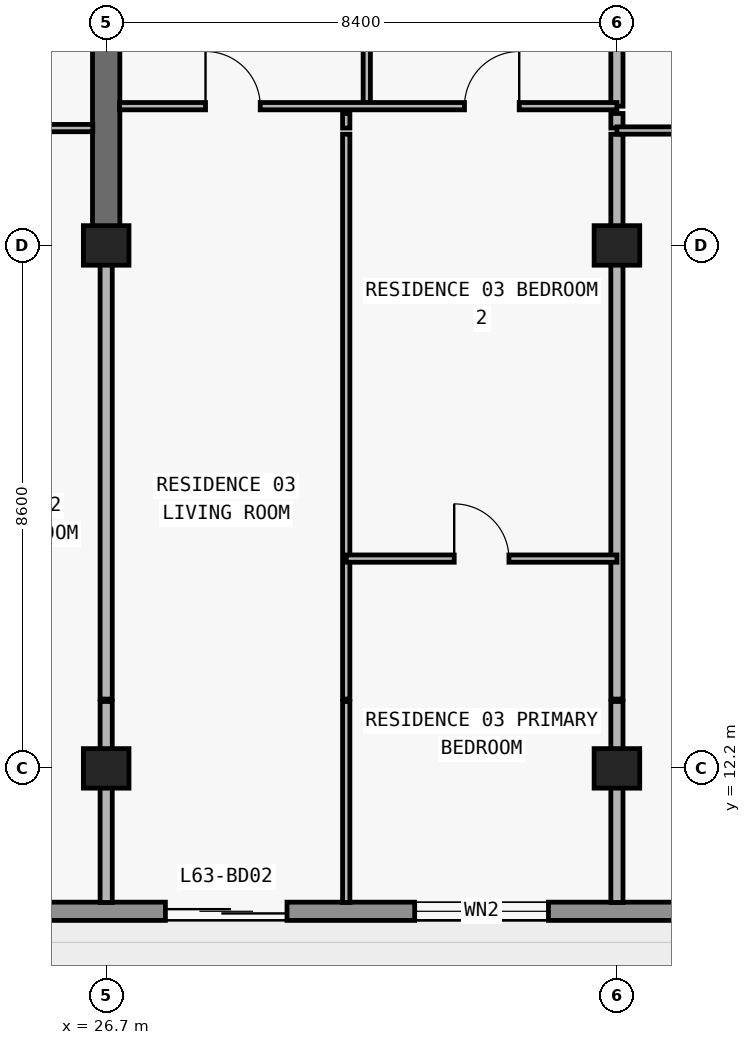
"""IFC4 building model, lengths in metres.
Left out: names, types, materials, properties, quantities, classifications, styles, units other than length and angle.
Written with IfcOpenShell. Run it as: python <this file> out.ifc"""

import sys

from ifc_helpers import new_model, si_unit, direction, frame, frame_2d, origin, origin_2d, place, context, subcontext, project, spatial, rectangle, extrude, element, fill, save


model = new_model("IFC4")
c1 = context("Model", 3, precision=1e-05, world=origin(), true_north=direction((0.0, 1.0)))
c2 = subcontext(c1, "Body", "Model", "MODEL_VIEW")
j1 = project(units=[si_unit("LENGTHUNIT", "METRE"), si_unit("PLANEANGLEUNIT", "RADIAN")], contexts=[c1])
p1 = place(None, origin())
s1 = spatial("IfcSite", under=j1, at=p1, CompositionType="ELEMENT")
p2 = place(p1, origin())
s2 = spatial("IfcBuilding", under=s1, at=p2, CompositionType="ELEMENT")
p3 = place(p2, frame((0.0, 0.0, 226.5)))
s3 = spatial("IfcBuildingStorey", under=s2, at=p3, CompositionType="ELEMENT", Elevation=226.5)
for number, where, z_axis, x_axis in (
    (1, (26.7, 12.2, 0.0), (0.0, 0.0, 1.0), (1.0, 0.0, 0.0)),
    (2, (35.1, 12.2, 0.0), (0.0, 0.0, 1.0), (1.0, 0.0, 0.0)),
    (3, (26.7, 20.8, 0.0), (0.0, 0.0, 1.0), (1.0, 0.0, 0.0)),
    (4, (35.1, 20.8, 0.0), (0.0, 0.0, 1.0), (1.0, 0.0, 0.0)),
):
    element("IfcColumn", number, at=place(p3, frame(where, z_axis=z_axis, x_axis=x_axis)), inside=s3, PredefinedType="COLUMN", context=c2, shape_type="SweptSolid", body=[
        extrude(rectangle(XDim=0.75, YDim=0.65, at=origin_2d()), origin(), (0.0, 0.0, 1.0), 3.05),
    ])
p4 = place(p3, frame((26.7, 20.8, 0.0), z_axis=(0.0, 0.0, 1.0), x_axis=(0.0, 1.0, 0.0)))
e5 = element("IfcWall", 5, at=p4, inside=s3, PredefinedType="SHEAR", context=c2, shape_type="SweptSolid", body=[
    extrude(rectangle(XDim=8.6, YDim=0.45, at=frame_2d((4.3, 0.0))), origin(), (0.0, 0.0, 1.0), 3.05),
])
p5 = place(p3, frame((65.7, 9.85, 0.0), z_axis=(0.0, 0.0, 1.0), x_axis=(-1.0, 0.0, 0.0)))
e6 = element("IfcWall", 6, at=p5, inside=s3, PredefinedType="STANDARD", context=c2, shape_type="SweptSolid", body=[
    extrude(rectangle(XDim=53.6, YDim=0.3, at=frame_2d((26.8, 0.0))), origin(), (0.0, 0.0, 1.0), 3.05),
])
p6 = place(p5, frame((48.05, 0.0, 0.85)))
e7 = element("IfcOpeningElement", 7, at=p6, cuts=e6, PredefinedType="OPENING", context=c2, shape_type="SweptSolid", body=[
    extrude(rectangle(XDim=1.8, YDim=1.55, at=frame_2d((0.9, 0.775))), frame((0.0, 0.16, 0.0), z_axis=(0.0, -1.0, 0.0), x_axis=(1.0, 0.0, 0.0)), (0.0, 0.0, 1.0), 0.32),
])
p7 = place(p5, frame((44.09, 0.0, 0.0)))
e8 = element("IfcOpeningElement", 8, at=p7, cuts=e6, PredefinedType="OPENING", context=c2, shape_type="SweptSolid", body=[
    extrude(rectangle(XDim=2.0, YDim=2.3, at=frame_2d((1.0, 1.15))), frame((0.0, 0.16, 0.0), z_axis=(0.0, -1.0, 0.0), x_axis=(1.0, 0.0, 0.0)), (0.0, 0.0, 1.0), 0.32),
])
p8 = place(p5, frame((39.99, 0.0, 0.85)))
e9 = element("IfcOpeningElement", 9, at=p8, cuts=e6, PredefinedType="OPENING", context=c2, shape_type="SweptSolid", body=[
    extrude(rectangle(XDim=1.8, YDim=1.55, at=frame_2d((0.9, 0.775))), frame((0.0, 0.16, 0.0), z_axis=(0.0, -1.0, 0.0), x_axis=(1.0, 0.0, 0.0)), (0.0, 0.0, 1.0), 0.32),
])
p9 = place(p5, frame((36.026, 0.0, 0.0)))
e10 = element("IfcOpeningElement", 10, at=p9, cuts=e6, PredefinedType="OPENING", context=c2, shape_type="SweptSolid", body=[
    extrude(rectangle(XDim=2.0, YDim=2.3, at=frame_2d((1.0, 1.15))), frame((0.0, 0.16, 0.0), z_axis=(0.0, -1.0, 0.0), x_axis=(1.0, 0.0, 0.0)), (0.0, 0.0, 1.0), 0.32),
])
p10 = place(p5, frame((31.726, 0.0, 0.85)))
e11 = element("IfcOpeningElement", 11, at=p10, cuts=e6, PredefinedType="OPENING", context=c2, shape_type="SweptSolid", body=[
    extrude(rectangle(XDim=2.2, YDim=1.55, at=frame_2d((1.1, 0.775))), frame((0.0, 0.16, 0.0), z_axis=(0.0, -1.0, 0.0), x_axis=(1.0, 0.0, 0.0)), (0.0, 0.0, 1.0), 0.32),
])
p11 = place(p5, frame((27.51, 0.0, 0.0)))
e12 = element("IfcOpeningElement", 12, at=p11, cuts=e6, PredefinedType="OPENING", context=c2, shape_type="SweptSolid", body=[
    extrude(rectangle(XDim=2.0, YDim=2.3, at=frame_2d((1.0, 1.15))), frame((0.0, 0.16, 0.0), z_axis=(0.0, -1.0, 0.0), x_axis=(1.0, 0.0, 0.0)), (0.0, 0.0, 1.0), 0.32),
])
p12 = place(p5, frame((23.81, 0.0, 0.85)))
e13 = element("IfcOpeningElement", 13, at=p12, cuts=e6, PredefinedType="OPENING", context=c2, shape_type="SweptSolid", body=[
    extrude(rectangle(XDim=1.8, YDim=1.55, at=frame_2d((0.9, 0.775))), frame((0.0, 0.16, 0.0), z_axis=(0.0, -1.0, 0.0), x_axis=(1.0, 0.0, 0.0)), (0.0, 0.0, 1.0), 0.32),
])
p13 = place(p5, frame((20.026, 0.0, 0.0)))
e14 = element("IfcOpeningElement", 14, at=p13, cuts=e6, PredefinedType="OPENING", context=c2, shape_type="SweptSolid", body=[
    extrude(rectangle(XDim=2.0, YDim=2.3, at=frame_2d((1.0, 1.15))), frame((0.0, 0.16, 0.0), z_axis=(0.0, -1.0, 0.0), x_axis=(1.0, 0.0, 0.0)), (0.0, 0.0, 1.0), 0.32),
])
p14 = place(p5, frame((15.726, 0.0, 0.85)))
e15 = element("IfcOpeningElement", 15, at=p14, cuts=e6, PredefinedType="OPENING", context=c2, shape_type="SweptSolid", body=[
    extrude(rectangle(XDim=2.2, YDim=1.55, at=frame_2d((1.1, 0.775))), frame((0.0, 0.16, 0.0), z_axis=(0.0, -1.0, 0.0), x_axis=(1.0, 0.0, 0.0)), (0.0, 0.0, 1.0), 0.32),
])
p15 = place(p5, frame((11.29, 0.0, 0.0)))
e16 = element("IfcOpeningElement", 16, at=p15, cuts=e6, PredefinedType="OPENING", context=c2, shape_type="SweptSolid", body=[
    extrude(rectangle(XDim=2.0, YDim=2.3, at=frame_2d((1.0, 1.15))), frame((0.0, 0.16, 0.0), z_axis=(0.0, -1.0, 0.0), x_axis=(1.0, 0.0, 0.0)), (0.0, 0.0, 1.0), 0.32),
])
p16 = place(p5, frame((7.19, 0.0, 0.85)))
e17 = element("IfcOpeningElement", 17, at=p16, cuts=e6, PredefinedType="OPENING", context=c2, shape_type="SweptSolid", body=[
    extrude(rectangle(XDim=1.8, YDim=1.55, at=frame_2d((0.9, 0.775))), frame((0.0, 0.16, 0.0), z_axis=(0.0, -1.0, 0.0), x_axis=(1.0, 0.0, 0.0)), (0.0, 0.0, 1.0), 0.32),
])
p17 = place(p5, frame((0.65, 0.0, 0.85)))
e18 = element("IfcOpeningElement", 18, at=p17, cuts=e6, PredefinedType="OPENING", context=c2, shape_type="SweptSolid", body=[
    extrude(rectangle(XDim=1.8, YDim=1.55, at=frame_2d((0.9, 0.775))), frame((0.0, 0.16, 0.0), z_axis=(0.0, -1.0, 0.0), x_axis=(1.0, 0.0, 0.0)), (0.0, 0.0, 1.0), 0.32),
])
p18 = place(p3, frame((26.7, 9.995, 0.0), z_axis=(0.0, 0.0, 1.0), x_axis=(0.0, 1.0, 0.0)))
e19 = element("IfcWall", 19, at=p18, inside=s3, PredefinedType="PARTITIONING", context=c2, shape_type="SweptSolid", body=[
    extrude(rectangle(XDim=3.305, YDim=0.2, at=frame_2d((1.652, 0.0))), origin(), (0.0, 0.0, 1.0), 2.263),
])
p19 = place(p3, frame((26.7, 13.34, 0.0), z_axis=(0.0, 0.0, 1.0), x_axis=(0.0, 1.0, 0.0)))
e20 = element("IfcWall", 20, at=p19, inside=s3, PredefinedType="PARTITIONING", context=c2, shape_type="SweptSolid", body=[
    extrude(rectangle(XDim=7.455, YDim=0.2, at=frame_2d((3.728, 0.0))), origin(), (0.0, 0.0, 1.0), 2.263),
])
p20 = place(p3, frame((30.648, 9.995, 0.0), z_axis=(0.0, 0.0, 1.0), x_axis=(0.0, 1.0, 0.0)))
e21 = element("IfcWall", 21, at=p20, inside=s3, PredefinedType="PARTITIONING", context=c2, shape_type="SweptSolid", body=[
    extrude(rectangle(XDim=3.305, YDim=0.12, at=frame_2d((1.652, 0.0))), origin(), (0.0, 0.0, 1.0), 3.05),
])
p21 = place(p3, frame((30.648, 13.34, 0.0), z_axis=(0.0, 0.0, 1.0), x_axis=(0.0, 1.0, 0.0)))
e22 = element("IfcWall", 22, at=p21, inside=s3, PredefinedType="PARTITIONING", context=c2, shape_type="SweptSolid", body=[
    extrude(rectangle(XDim=9.29, YDim=0.12, at=frame_2d((4.645, 0.0))), origin(), (0.0, 0.0, 1.0), 3.05),
])
p22 = place(p3, frame((30.648, 22.73, 0.0), z_axis=(0.0, 0.0, 1.0), x_axis=(0.0, 1.0, 0.0)))
e23 = element("IfcWall", 23, at=p22, inside=s3, PredefinedType="PARTITIONING", context=c2, shape_type="SweptSolid", body=[
    extrude(rectangle(XDim=0.24, YDim=0.12, at=frame_2d((0.12, 0.0))), origin(), (0.0, 0.0, 1.0), 3.05),
])
p23 = place(p3, frame((30.986, 23.09, 0.0), z_axis=(0.0, 0.0, 1.0), x_axis=(0.0, 1.0, 0.0)))
e24 = element("IfcWall", 24, at=p23, inside=s3, PredefinedType="PARTITIONING", context=c2, shape_type="SweptSolid", body=[
    extrude(rectangle(XDim=4.69, YDim=0.12, at=frame_2d((2.345, 0.0))), origin(), (0.0, 0.0, 1.0), 2.629),
])
p24 = place(p23, frame((1.895, 0.0, 0.0)))
e25 = element("IfcOpeningElement", 25, at=p24, cuts=e24, PredefinedType="OPENING", context=c2, shape_type="SweptSolid", body=[
    extrude(rectangle(XDim=0.9, YDim=2.15, at=frame_2d((0.45, 1.075))), frame((0.0, 0.07, 0.0), z_axis=(0.0, -1.0, 0.0), x_axis=(1.0, 0.0, 0.0)), (0.0, 0.0, 1.0), 0.14),
])
p25 = place(p3, frame((35.1, 9.995, 0.0), z_axis=(0.0, 0.0, 1.0), x_axis=(0.0, 1.0, 0.0)))
e26 = element("IfcWall", 26, at=p25, inside=s3, PredefinedType="PARTITIONING", context=c2, shape_type="SweptSolid", body=[
    extrude(rectangle(XDim=3.305, YDim=0.2, at=frame_2d((1.652, 0.0))), origin(), (0.0, 0.0, 1.0), 2.263),
])
p26 = place(p3, frame((35.1, 13.34, 0.0), z_axis=(0.0, 0.0, 1.0), x_axis=(0.0, 1.0, 0.0)))
e27 = element("IfcWall", 27, at=p26, inside=s3, PredefinedType="PARTITIONING", context=c2, shape_type="SweptSolid", body=[
    extrude(rectangle(XDim=9.29, YDim=0.2, at=frame_2d((4.645, 0.0))), origin(), (0.0, 0.0, 1.0), 2.263),
])
p27 = place(p3, frame((35.1, 22.73, 0.0), z_axis=(0.0, 0.0, 1.0), x_axis=(0.0, 1.0, 0.0)))
e28 = element("IfcWall", 28, at=p27, inside=s3, PredefinedType="PARTITIONING", context=c2, shape_type="SweptSolid", body=[
    extrude(rectangle(XDim=0.24, YDim=0.2, at=frame_2d((0.12, 0.0))), origin(), (0.0, 0.0, 1.0), 2.263),
])
p28 = place(p3, frame((35.1, 23.09, 0.0), z_axis=(0.0, 0.0, 1.0), x_axis=(0.0, 1.0, 0.0)))
e29 = element("IfcWall", 29, at=p28, inside=s3, PredefinedType="PARTITIONING", context=c2, shape_type="SweptSolid", body=[
    extrude(rectangle(XDim=4.69, YDim=0.2, at=frame_2d((2.345, 0.0))), origin(), (0.0, 0.0, 1.0), 2.263),
])
p29 = place(p3, frame((30.648, 15.65, 0.0), z_axis=(0.0, 0.0, 1.0), x_axis=(1.0, 0.0, 0.0)))
e30 = element("IfcWall", 30, at=p29, inside=s3, PredefinedType="PARTITIONING", context=c2, shape_type="SweptSolid", body=[
    extrude(rectangle(XDim=4.452, YDim=0.12, at=frame_2d((2.226, 0.0))), origin(), (0.0, 0.0, 1.0), 3.05),
])
p30 = place(p29, frame((1.776, 0.0, 0.0)))
e31 = element("IfcOpeningElement", 31, at=p30, cuts=e30, PredefinedType="OPENING", context=c2, shape_type="SweptSolid", body=[
    extrude(rectangle(XDim=0.9, YDim=2.15, at=frame_2d((0.45, 1.075))), frame((0.0, 0.07, 0.0), z_axis=(0.0, -1.0, 0.0), x_axis=(1.0, 0.0, 0.0)), (0.0, 0.0, 1.0), 0.14),
])
p31 = place(p3, frame((35.1, 22.69, 0.0), z_axis=(0.0, 0.0, 1.0), x_axis=(1.0, 0.0, 0.0)))
e32 = element("IfcWall", 32, at=p31, inside=s3, PredefinedType="PARTITIONING", context=c2, shape_type="SweptSolid", body=[
    extrude(rectangle(XDim=4.104, YDim=0.12, at=frame_2d((2.052, 0.0))), origin(), (0.0, 0.0, 1.0), 3.05),
])
p32 = place(p31, frame((1.602, 0.0, 0.0)))
e33 = element("IfcOpeningElement", 33, at=p32, cuts=e32, PredefinedType="OPENING", context=c2, shape_type="SweptSolid", body=[
    extrude(rectangle(XDim=0.9, YDim=2.15, at=frame_2d((0.45, 1.075))), frame((0.0, 0.07, 0.0), z_axis=(0.0, -1.0, 0.0), x_axis=(1.0, 0.0, 0.0)), (0.0, 0.0, 1.0), 0.14),
])
p33 = place(p3, frame((18.3, 22.73, 0.0), z_axis=(0.0, 0.0, 1.0), x_axis=(1.0, 0.0, 0.0)))
e34 = element("IfcWall", 34, at=p33, inside=s3, PredefinedType="PARTITIONING", context=c2, shape_type="SweptSolid", body=[
    extrude(rectangle(XDim=8.18, YDim=0.12, at=frame_2d((4.09, 0.0))), origin(), (0.0, 0.0, 1.0), 3.05),
])
p34 = place(p33, frame((1.86, 0.0, 0.0)))
e35 = element("IfcOpeningElement", 35, at=p34, cuts=e34, PredefinedType="OPENING", context=c2, shape_type="SweptSolid", body=[
    extrude(rectangle(XDim=0.9, YDim=2.15, at=frame_2d((0.45, 1.075))), frame((0.0, 0.07, 0.0), z_axis=(0.0, -1.0, 0.0), x_axis=(1.0, 0.0, 0.0)), (0.0, 0.0, 1.0), 0.14),
])
p35 = place(p33, frame((6.033, 0.0, 0.0)))
e36 = element("IfcOpeningElement", 36, at=p35, cuts=e34, PredefinedType="OPENING", context=c2, shape_type="SweptSolid", body=[
    extrude(rectangle(XDim=0.9, YDim=2.15, at=frame_2d((0.45, 1.075))), frame((0.0, 0.07, 0.0), z_axis=(0.0, -1.0, 0.0), x_axis=(1.0, 0.0, 0.0)), (0.0, 0.0, 1.0), 0.14),
])
p36 = place(p3, frame((26.92, 23.09, 0.0), z_axis=(0.0, 0.0, 1.0), x_axis=(1.0, 0.0, 0.0)))
e37 = element("IfcWall", 37, at=p36, inside=s3, PredefinedType="PARTITIONING", context=c2, shape_type="SweptSolid", body=[
    extrude(rectangle(XDim=8.18, YDim=0.12, at=frame_2d((4.09, 0.0))), origin(), (0.0, 0.0, 1.0), 3.05),
])
p37 = place(p36, frame((1.414, 0.0, 0.0)))
e38 = element("IfcOpeningElement", 38, at=p37, cuts=e37, PredefinedType="OPENING", context=c2, shape_type="SweptSolid", body=[
    extrude(rectangle(XDim=0.9, YDim=2.15, at=frame_2d((0.45, 1.075))), frame((0.0, 0.07, 0.0), z_axis=(0.0, -1.0, 0.0), x_axis=(1.0, 0.0, 0.0)), (0.0, 0.0, 1.0), 0.14),
])
p38 = place(p36, frame((5.673, 0.0, 0.0)))
e39 = element("IfcOpeningElement", 39, at=p38, cuts=e37, PredefinedType="OPENING", context=c2, shape_type="SweptSolid", body=[
    extrude(rectangle(XDim=0.9, YDim=2.15, at=frame_2d((0.45, 1.075))), frame((0.0, 0.07, 0.0), z_axis=(0.0, -1.0, 0.0), x_axis=(1.0, 0.0, 0.0)), (0.0, 0.0, 1.0), 0.14),
])
p39 = place(p9, origin())
e40 = element("IfcDoor", 40, at=p39, inside=s3, OperationType="DOUBLE_DOOR_SLIDING", PredefinedType="DOOR", context=c2, shape_type="SweptSolid", body=[
    extrude(rectangle(XDim=2.0, YDim=2.3, at=frame_2d((1.0, 1.15))), frame((0.0, 0.025, 0.0), z_axis=(0.0, -1.0, 0.0), x_axis=(1.0, 0.0, 0.0)), (0.0, 0.0, 1.0), 0.05),
])
fill(e10, e40)
p40 = place(p10, origin())
e41 = element("IfcWindow", 41, at=p40, inside=s3, PartitioningType="SINGLE_PANEL", PredefinedType="WINDOW", context=c2, shape_type="SweptSolid", body=[
    extrude(rectangle(XDim=2.2, YDim=1.55, at=frame_2d((1.1, 0.775))), frame((0.0, 0.03, 0.0), z_axis=(0.0, -1.0, 0.0), x_axis=(1.0, 0.0, 0.0)), (0.0, 0.0, 1.0), 0.06),
])
fill(e11, e41)
p41 = place(p37, origin())
e42 = element("IfcDoor", 42, at=p41, inside=s3, OperationType="SINGLE_SWING_LEFT", PredefinedType="DOOR", context=c2, shape_type="SweptSolid", body=[
    extrude(rectangle(XDim=0.9, YDim=2.15, at=frame_2d((0.45, 1.075))), frame((0.0, 0.025, 0.0), z_axis=(0.0, -1.0, 0.0), x_axis=(1.0, 0.0, 0.0)), (0.0, 0.0, 1.0), 0.05),
])
fill(e38, e42)
p42 = place(p38, origin())
e43 = element("IfcDoor", 43, at=p42, inside=s3, OperationType="SINGLE_SWING_RIGHT", PredefinedType="DOOR", context=c2, shape_type="SweptSolid", body=[
    extrude(rectangle(XDim=0.9, YDim=2.15, at=frame_2d((0.45, 1.075))), frame((0.0, 0.025, 0.0), z_axis=(0.0, -1.0, 0.0), x_axis=(1.0, 0.0, 0.0)), (0.0, 0.0, 1.0), 0.05),
])
fill(e39, e43)
p43 = place(p30, origin())
e44 = element("IfcDoor", 44, at=p43, inside=s3, OperationType="SINGLE_SWING_LEFT", PredefinedType="DOOR", context=c2, shape_type="SweptSolid", body=[
    extrude(rectangle(XDim=0.9, YDim=2.15, at=frame_2d((0.45, 1.075))), frame((0.0, 0.025, 0.0), z_axis=(0.0, -1.0, 0.0), x_axis=(1.0, 0.0, 0.0)), (0.0, 0.0, 1.0), 0.05),
])
fill(e31, e44)
save(model, sys.argv[1])
